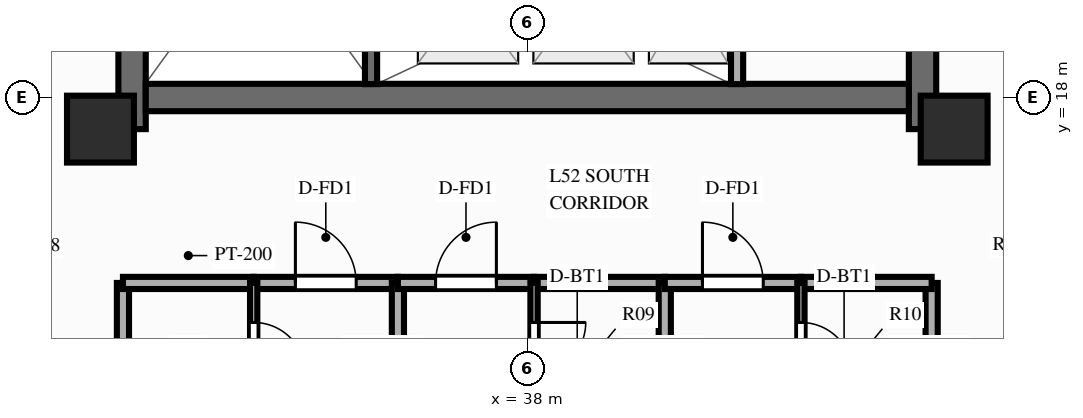
"""IFC4 building model, lengths in metres.
Left out: names, types, materials, properties, quantities, classifications, styles, units other than length and angle.
Written with IfcOpenShell. Run it as: python <this file> out.ifc"""

import sys

from ifc_helpers import new_model, si_unit, direction, frame, frame_2d, origin, origin_2d, place, context, subcontext, project, spatial, rectangle, extrude, source, transform, mapped, element, fill, save


model = new_model("IFC4")
c1 = context("Model", 3, precision=1e-05, world=origin(), true_north=direction((0.0, 1.0)))
c2 = subcontext(c1, "Body", "Model", "MODEL_VIEW")
j1 = project(units=[si_unit("LENGTHUNIT", "METRE"), si_unit("PLANEANGLEUNIT", "RADIAN")], contexts=[c1])
p1 = place(None, origin())
s1 = spatial("IfcSite", under=j1, at=p1, CompositionType="ELEMENT")
p2 = place(p1, origin())
s2 = spatial("IfcBuilding", under=s1, at=p2, CompositionType="ELEMENT")
p3 = place(p2, frame((0.0, 0.0, 166.0)))
s3 = spatial("IfcBuildingStorey", under=s2, at=p3, CompositionType="ELEMENT", Elevation=166.0)
p4 = place(p3, frame((31.5, 17.48, 0.0), z_axis=(0.0, 0.0, 1.0), x_axis=(0.0, 1.0, 0.0)))
e1 = element("IfcWall", 1, at=p4, inside=s3, PredefinedType="SHEAR", context=c2, shape_type="SweptSolid", body=[
    extrude(rectangle(XDim=19.04, YDim=0.45, at=frame_2d((9.52, 0.0))), origin(), (0.0, 0.0, 1.0), 3.0),
])
p5 = place(p4, frame((6.32, 0.0, 0.0)))
e2 = element("IfcOpeningElement", 2, at=p5, cuts=e1, PredefinedType="OPENING", context=c2, shape_type="SweptSolid", body=[
    extrude(rectangle(XDim=1.1, YDim=2.15, at=frame_2d((0.55, 1.075))), frame((0.0, 0.237, 0.0), z_axis=(0.0, -1.0, 0.0), x_axis=(1.0, 0.0, 0.0)), (0.0, 0.0, 1.0), 0.474),
])
p6 = place(p3, frame((44.5, 17.48, 0.0), z_axis=(0.0, 0.0, 1.0), x_axis=(0.0, 1.0, 0.0)))
e3 = element("IfcWall", 3, at=p6, inside=s3, PredefinedType="SHEAR", context=c2, shape_type="SweptSolid", body=[
    extrude(rectangle(XDim=19.04, YDim=0.45, at=frame_2d((9.52, 0.0))), origin(), (0.0, 0.0, 1.0), 3.0),
])
p7 = place(p6, frame((12.67, 0.0, 0.0), z_axis=(0.0, 0.0, 1.0), x_axis=(-1.0, 0.0, 0.0)))
e4 = element("IfcOpeningElement", 4, at=p7, cuts=e3, PredefinedType="OPENING", context=c2, shape_type="SweptSolid", body=[
    extrude(rectangle(XDim=1.1, YDim=2.15, at=frame_2d((0.55, 1.075))), frame((0.0, 0.237, 0.0), z_axis=(0.0, -1.0, 0.0), x_axis=(1.0, 0.0, 0.0)), (0.0, 0.0, 1.0), 0.474),
])
p8 = place(p3, frame((31.725, 18.0, 0.0), z_axis=(0.0, 0.0, 1.0), x_axis=(1.0, 0.0, 0.0)))
e5 = element("IfcWall", 5, at=p8, inside=s3, PredefinedType="SHEAR", context=c2, shape_type="SweptSolid", body=[
    extrude(rectangle(XDim=12.55, YDim=0.45, at=frame_2d((6.275, 0.0))), origin(), (0.0, 0.0, 1.0), 3.0),
])
m1 = source(origin(), c2, "Body", "SweptSolid", [
    extrude(rectangle(XDim=1.1, YDim=1.1, at=origin_2d()), origin(), (0.0, 0.0, 1.0), 3.0),
])
for number, where, z_axis, x_axis in (
    (6, (30.98, 17.48, 0.0), (0.0, 0.0, 1.0), (1.0, 0.0, 0.0)),
    (7, (45.02, 17.48, 0.0), (0.0, 0.0, 1.0), (1.0, 0.0, 0.0)),
):
    element("IfcColumn", number, at=place(p3, frame(where, z_axis=z_axis, x_axis=x_axis)), inside=s3, PredefinedType="COLUMN", context=c2, shape_type="MappedRepresentation", body=[
        mapped(m1, transform((0.0, 0.0, 0.0), scale=1.0)),
    ])
p9 = place(p3, frame((41.45, 18.22, 0.0), z_axis=(0.0, 0.0, 1.0), x_axis=(0.0, 1.0, 0.0)))
e8 = element("IfcWall", 8, at=p9, inside=s3, PredefinedType="PARTITIONING", context=c2, shape_type="SweptSolid", body=[
    extrude(rectangle(XDim=2.96, YDim=0.2, at=frame_2d((1.48, 0.0))), origin(), (0.0, 0.0, 1.0), 2.79),
])
p10 = place(p3, frame((35.43, 18.22, 0.0), z_axis=(0.0, 0.0, 1.0), x_axis=(0.0, 1.0, 0.0)))
e9 = element("IfcWall", 9, at=p10, inside=s3, PredefinedType="SOLIDWALL", context=c2, shape_type="SweptSolid", body=[
    extrude(rectangle(XDim=7.22, YDim=0.2, at=frame_2d((3.61, 0.0))), origin(), (0.0, 0.0, 1.0), 2.79),
])
p11 = place(p10, frame((6.68, 0.0, 0.0), z_axis=(0.0, 0.0, 1.0), x_axis=(-1.0, 0.0, 0.0)))
e10 = element("IfcOpeningElement", 10, at=p11, cuts=e9, PredefinedType="OPENING", context=c2, shape_type="SweptSolid", body=[
    extrude(rectangle(XDim=1.1, YDim=2.15, at=frame_2d((0.55, 1.075))), frame((0.0, 0.112, 0.0), z_axis=(0.0, -1.0, 0.0), x_axis=(1.0, 0.0, 0.0)), (0.0, 0.0, 1.0), 0.224),
])
for number, where, z_axis, x_axis in (
    (11, (31.35, 14.95, 0.0), (0.0, 0.0, 1.0), (0.0, -1.0, 0.0)),
    (12, (44.65, 14.95, 0.0), (0.0, 0.0, 1.0), (0.0, -1.0, 0.0)),
):
    element("IfcWall", number, at=place(p3, frame(where, z_axis=z_axis, x_axis=x_axis)), inside=s3, PredefinedType="PARTITIONING", context=c2, shape_type="SweptSolid", body=[
        extrude(rectangle(XDim=8.8, YDim=0.2, at=frame_2d((4.4, 0.0))), origin(), (0.0, 0.0, 1.0), 2.34),
    ])
p12 = place(p3, frame((31.35, 14.95, 0.0), z_axis=(0.0, 0.0, 1.0), x_axis=(1.0, 0.0, 0.0)))
e13 = element("IfcWall", 13, at=p12, inside=s3, PredefinedType="PARTITIONING", context=c2, shape_type="SweptSolid", body=[
    extrude(rectangle(XDim=2.15, YDim=0.2, at=frame_2d((1.075, 0.0))), origin(), (0.0, 0.0, 1.0), 2.79),
])
p13 = place(p3, frame((33.5, 14.95, 0.0), z_axis=(0.0, 0.0, 1.0), x_axis=(1.0, 0.0, 0.0)))
e14 = element("IfcWall", 14, at=p13, inside=s3, PredefinedType="PARTITIONING", context=c2, shape_type="SweptSolid", body=[
    extrude(rectangle(XDim=2.372, YDim=0.2, at=frame_2d((1.186, 0.0))), origin(), (0.0, 0.0, 1.0), 2.79),
])
p14 = place(p13, frame((0.686, 0.0, 0.0)))
e15 = element("IfcOpeningElement", 15, at=p14, cuts=e14, PredefinedType="OPENING", context=c2, shape_type="SweptSolid", body=[
    extrude(rectangle(XDim=1.0, YDim=2.15, at=frame_2d((0.5, 1.075))), frame((0.0, 0.112, 0.0), z_axis=(0.0, -1.0, 0.0), x_axis=(1.0, 0.0, 0.0)), (0.0, 0.0, 1.0), 0.224),
])
p15 = place(p3, frame((33.5, 14.95, 0.0), z_axis=(0.0, 0.0, 1.0), x_axis=(0.0, -1.0, 0.0)))
e16 = element("IfcWall", 16, at=p15, inside=s3, PredefinedType="PARTITIONING", context=c2, shape_type="SweptSolid", body=[
    extrude(rectangle(XDim=2.15, YDim=0.12, at=frame_2d((1.075, 0.0))), origin(), (0.0, 0.0, 1.0), 2.79),
])
p16 = place(p15, frame((0.65, 0.0, 0.0)))
e17 = element("IfcOpeningElement", 17, at=p16, cuts=e16, PredefinedType="OPENING", context=c2, shape_type="SweptSolid", body=[
    extrude(rectangle(XDim=0.85, YDim=2.05, at=frame_2d((0.425, 1.025))), frame((0.0, 0.072, 0.0), z_axis=(0.0, -1.0, 0.0), x_axis=(1.0, 0.0, 0.0)), (0.0, 0.0, 1.0), 0.144),
])
p17 = place(p3, frame((35.872, 14.95, 0.0), z_axis=(0.0, 0.0, 1.0), x_axis=(0.0, -1.0, 0.0)))
e18 = element("IfcWall", 18, at=p17, inside=s3, PredefinedType="PARTITIONING", context=c2, shape_type="SweptSolid", body=[
    extrude(rectangle(XDim=8.8, YDim=0.2, at=frame_2d((4.4, 0.0))), origin(), (0.0, 0.0, 1.0), 2.79),
])
p18 = place(p3, frame((35.872, 14.95, 0.0), z_axis=(0.0, 0.0, 1.0), x_axis=(1.0, 0.0, 0.0)))
e19 = element("IfcWall", 19, at=p18, inside=s3, PredefinedType="PARTITIONING", context=c2, shape_type="SweptSolid", body=[
    extrude(rectangle(XDim=2.239, YDim=0.2, at=frame_2d((1.12, 0.0))), origin(), (0.0, 0.0, 1.0), 2.79),
])
p19 = place(p18, frame((0.619, 0.0, 0.0)))
e20 = element("IfcOpeningElement", 20, at=p19, cuts=e19, PredefinedType="OPENING", context=c2, shape_type="SweptSolid", body=[
    extrude(rectangle(XDim=1.0, YDim=2.15, at=frame_2d((0.5, 1.075))), frame((0.0, 0.112, 0.0), z_axis=(0.0, -1.0, 0.0), x_axis=(1.0, 0.0, 0.0)), (0.0, 0.0, 1.0), 0.224),
])
p20 = place(p3, frame((38.111, 14.95, 0.0), z_axis=(0.0, 0.0, 1.0), x_axis=(1.0, 0.0, 0.0)))
e21 = element("IfcWall", 21, at=p20, inside=s3, PredefinedType="PARTITIONING", context=c2, shape_type="SweptSolid", body=[
    extrude(rectangle(XDim=2.15, YDim=0.2, at=frame_2d((1.075, 0.0))), origin(), (0.0, 0.0, 1.0), 2.79),
])
p21 = place(p3, frame((38.111, 14.95, 0.0), z_axis=(0.0, 0.0, 1.0), x_axis=(0.0, -1.0, 0.0)))
e22 = element("IfcWall", 22, at=p21, inside=s3, PredefinedType="PARTITIONING", context=c2, shape_type="SweptSolid", body=[
    extrude(rectangle(XDim=2.15, YDim=0.12, at=frame_2d((1.075, 0.0))), origin(), (0.0, 0.0, 1.0), 2.79),
])
p22 = place(p21, frame((0.65, 0.0, 0.0)))
e23 = element("IfcOpeningElement", 23, at=p22, cuts=e22, PredefinedType="OPENING", context=c2, shape_type="SweptSolid", body=[
    extrude(rectangle(XDim=0.85, YDim=2.05, at=frame_2d((0.425, 1.025))), frame((0.0, 0.072, 0.0), z_axis=(0.0, -1.0, 0.0), x_axis=(1.0, 0.0, 0.0)), (0.0, 0.0, 1.0), 0.144),
])
p23 = place(p3, frame((40.261, 14.95, 0.0), z_axis=(0.0, 0.0, 1.0), x_axis=(0.0, -1.0, 0.0)))
e24 = element("IfcWall", 24, at=p23, inside=s3, PredefinedType="PARTITIONING", context=c2, shape_type="SweptSolid", body=[
    extrude(rectangle(XDim=8.8, YDim=0.2, at=frame_2d((4.4, 0.0))), origin(), (0.0, 0.0, 1.0), 2.79),
])
p24 = place(p3, frame((40.261, 14.95, 0.0), z_axis=(0.0, 0.0, 1.0), x_axis=(1.0, 0.0, 0.0)))
e25 = element("IfcWall", 25, at=p24, inside=s3, PredefinedType="PARTITIONING", context=c2, shape_type="SweptSolid", body=[
    extrude(rectangle(XDim=2.239, YDim=0.2, at=frame_2d((1.12, 0.0))), origin(), (0.0, 0.0, 1.0), 2.79),
])
p25 = place(p24, frame((0.619, 0.0, 0.0)))
e26 = element("IfcOpeningElement", 26, at=p25, cuts=e25, PredefinedType="OPENING", context=c2, shape_type="SweptSolid", body=[
    extrude(rectangle(XDim=1.0, YDim=2.15, at=frame_2d((0.5, 1.075))), frame((0.0, 0.112, 0.0), z_axis=(0.0, -1.0, 0.0), x_axis=(1.0, 0.0, 0.0)), (0.0, 0.0, 1.0), 0.224),
])
p26 = place(p3, frame((42.5, 14.95, 0.0), z_axis=(0.0, 0.0, 1.0), x_axis=(1.0, 0.0, 0.0)))
e27 = element("IfcWall", 27, at=p26, inside=s3, PredefinedType="PARTITIONING", context=c2, shape_type="SweptSolid", body=[
    extrude(rectangle(XDim=2.15, YDim=0.2, at=frame_2d((1.075, 0.0))), origin(), (0.0, 0.0, 1.0), 2.79),
])
p27 = place(p3, frame((42.5, 14.95, 0.0), z_axis=(0.0, 0.0, 1.0), x_axis=(0.0, -1.0, 0.0)))
e28 = element("IfcWall", 28, at=p27, inside=s3, PredefinedType="PARTITIONING", context=c2, shape_type="SweptSolid", body=[
    extrude(rectangle(XDim=2.15, YDim=0.12, at=frame_2d((1.075, 0.0))), origin(), (0.0, 0.0, 1.0), 2.79),
])
p28 = place(p27, frame((0.65, 0.0, 0.0)))
e29 = element("IfcOpeningElement", 29, at=p28, cuts=e28, PredefinedType="OPENING", context=c2, shape_type="SweptSolid", body=[
    extrude(rectangle(XDim=0.85, YDim=2.05, at=frame_2d((0.425, 1.025))), frame((0.0, 0.072, 0.0), z_axis=(0.0, -1.0, 0.0), x_axis=(1.0, 0.0, 0.0)), (0.0, 0.0, 1.0), 0.144),
])
m2 = source(origin(), c2, "Body", "SweptSolid", [
    extrude(rectangle(XDim=1.0, YDim=2.15, at=frame_2d((0.5, 1.075))), frame((0.0, 0.025, 0.0), z_axis=(0.0, -1.0, 0.0), x_axis=(1.0, 0.0, 0.0)), (0.0, 0.0, 1.0), 0.05),
])
p29 = place(p14, origin())
e30 = element("IfcDoor", 30, at=p29, inside=s3, OperationType="SINGLE_SWING_LEFT", PredefinedType="DOOR", context=c2, shape_type="MappedRepresentation", body=[
    mapped(m2, transform((0.0, 0.0, 0.0), scale=1.0)),
])
fill(e15, e30)
m3 = source(origin(), c2, "Body", "SweptSolid", [
    extrude(rectangle(XDim=0.85, YDim=2.05, at=frame_2d((0.425, 1.025))), frame((0.0, 0.025, 0.0), z_axis=(0.0, -1.0, 0.0), x_axis=(1.0, 0.0, 0.0)), (0.0, 0.0, 1.0), 0.05),
])
p30 = place(p16, origin())
e31 = element("IfcDoor", 31, at=p30, inside=s3, OperationType="SINGLE_SWING_RIGHT", PredefinedType="DOOR", context=c2, shape_type="MappedRepresentation", body=[
    mapped(m3, transform((0.0, 0.0, 0.0), scale=1.0)),
])
fill(e17, e31)
p31 = place(p19, origin())
e32 = element("IfcDoor", 32, at=p31, inside=s3, OperationType="SINGLE_SWING_RIGHT", PredefinedType="DOOR", context=c2, shape_type="MappedRepresentation", body=[
    mapped(m2, transform((0.0, 0.0, 0.0), scale=1.0)),
])
fill(e20, e32)
p32 = place(p22, origin())
e33 = element("IfcDoor", 33, at=p32, inside=s3, OperationType="SINGLE_SWING_LEFT", PredefinedType="DOOR", context=c2, shape_type="MappedRepresentation", body=[
    mapped(m3, transform((0.0, 0.0, 0.0), scale=1.0)),
])
fill(e23, e33)
p33 = place(p25, origin())
e34 = element("IfcDoor", 34, at=p33, inside=s3, OperationType="SINGLE_SWING_LEFT", PredefinedType="DOOR", context=c2, shape_type="MappedRepresentation", body=[
    mapped(m2, transform((0.0, 0.0, 0.0), scale=1.0)),
])
fill(e26, e34)
p34 = place(p28, origin())
e35 = element("IfcDoor", 35, at=p34, inside=s3, OperationType="SINGLE_SWING_RIGHT", PredefinedType="DOOR", context=c2, shape_type="MappedRepresentation", body=[
    mapped(m3, transform((0.0, 0.0, 0.0), scale=1.0)),
])
fill(e29, e35)
save(model, sys.argv[1])
